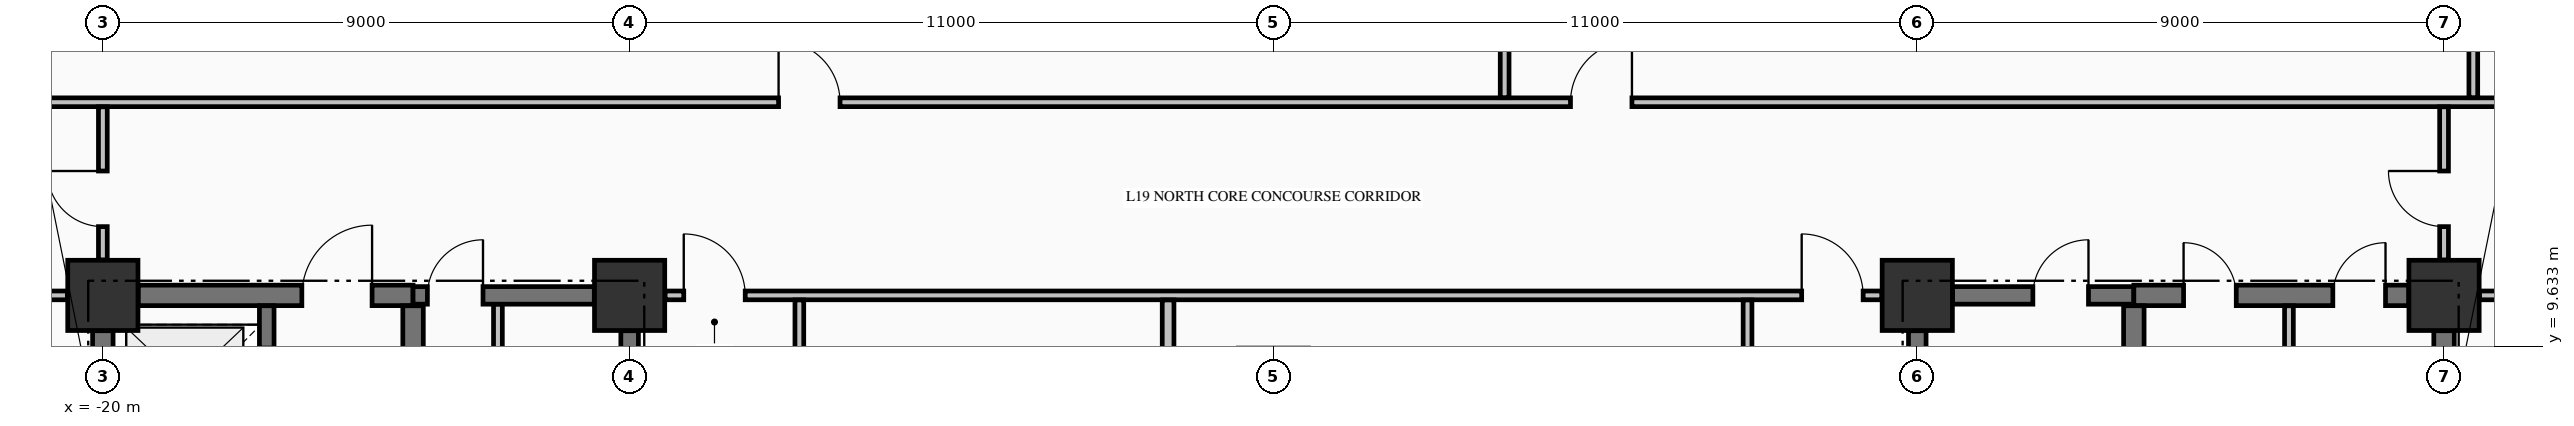
"""IFC4 building model, lengths in metres.
Left out: names, types, materials, properties, quantities, classifications, styles, units other than length and angle.
Written with IfcOpenShell. Run it as: python <this file> out.ifc"""

import sys

from ifc_helpers import new_model, si_unit, direction, frame, frame_2d, origin, origin_2d, place, context, subcontext, project, spatial, rectangle, extrude, element, fill, save


model = new_model("IFC4")
c1 = context("Model", 3, precision=1e-05, world=origin(), true_north=direction((0.0, 1.0)))
c2 = subcontext(c1, "Body", "Model", "MODEL_VIEW")
j1 = project(units=[si_unit("LENGTHUNIT", "METRE"), si_unit("PLANEANGLEUNIT", "RADIAN")], contexts=[c1])
p1 = place(None, origin())
s1 = spatial("IfcSite", under=j1, at=p1, CompositionType="ELEMENT")
p2 = place(p1, origin())
s2 = spatial("IfcBuilding", under=s1, at=p2, CompositionType="ELEMENT")
p3 = place(p2, frame((0.0, 0.0, 78.61)))
s3 = spatial("IfcBuildingStorey", under=s2, at=p3, CompositionType="ELEMENT", Elevation=78.61)
for number, where, z_axis, x_axis in (
    (1, (-20.0, 10.5, -0.25), (0.0, 0.0, 1.0), (1.0, 0.0, 0.0)),
    (2, (-11.0, 10.5, -0.25), (0.0, 0.0, 1.0), (1.0, 0.0, 0.0)),
    (3, (11.0, 10.5, -0.25), (0.0, 0.0, 1.0), (1.0, 0.0, 0.0)),
    (4, (20.0, 10.5, -0.25), (0.0, 0.0, 1.0), (1.0, 0.0, 0.0)),
):
    element("IfcColumn", number, at=place(p3, frame(where, z_axis=z_axis, x_axis=x_axis)), inside=s3, PredefinedType="COLUMN", context=c2, shape_type="SweptSolid", body=[
        extrude(rectangle(XDim=1.2, YDim=1.2, at=origin_2d()), origin(), (0.0, 0.0, 1.0), 3.395),
    ])
p4 = place(p3, frame((-19.396, 10.5, 0.0), z_axis=(0.0, 0.0, 1.0), x_axis=(1.0, 0.0, 0.0)))
e5 = element("IfcWall", 5, at=p4, inside=s3, PredefinedType="SHEAR", context=c2, shape_type="SweptSolid", body=[
    extrude(rectangle(XDim=4.696, YDim=0.35, at=frame_2d((2.348, 0.0))), origin(), (0.0, 0.0, 1.0), 3.145),
])
p5 = place(p4, frame((2.796, 0.0, 0.0)))
e6 = element("IfcOpeningElement", 6, at=p5, cuts=e5, PredefinedType="OPENING", context=c2, shape_type="SweptSolid", body=[
    extrude(rectangle(XDim=1.2, YDim=2.15, at=frame_2d((0.6, 1.075))), frame((0.0, 0.185, 0.0), z_axis=(0.0, -1.0, 0.0), x_axis=(1.0, 0.0, 0.0)), (0.0, 0.0, 1.0), 0.37),
])
p6 = place(p3, frame((-14.7, 10.5, 0.0), z_axis=(0.0, 0.0, 1.0), x_axis=(1.0, 0.0, 0.0)))
e7 = element("IfcWall", 7, at=p6, inside=s3, PredefinedType="SHEAR", context=c2, shape_type="SweptSolid", body=[
    extrude(rectangle(XDim=3.096, YDim=0.3, at=frame_2d((1.548, 0.0))), origin(), (0.0, 0.0, 1.0), 3.145),
])
p7 = place(p6, frame((0.245, 0.0, 0.0)))
e8 = element("IfcOpeningElement", 8, at=p7, cuts=e7, PredefinedType="OPENING", context=c2, shape_type="SweptSolid", body=[
    extrude(rectangle(XDim=0.95, YDim=2.15, at=frame_2d((0.475, 1.075))), frame((0.0, 0.16, 0.0), z_axis=(0.0, -1.0, 0.0), x_axis=(1.0, 0.0, 0.0)), (0.0, 0.0, 1.0), 0.32),
])
p8 = place(p3, frame((11.604, 10.5, 0.0), z_axis=(0.0, 0.0, 1.0), x_axis=(1.0, 0.0, 0.0)))
e9 = element("IfcWall", 9, at=p8, inside=s3, PredefinedType="SHEAR", context=c2, shape_type="SweptSolid", body=[
    extrude(rectangle(XDim=3.096, YDim=0.3, at=frame_2d((1.548, 0.0))), origin(), (0.0, 0.0, 1.0), 3.145),
])
p9 = place(p8, frame((1.371, 0.0, 0.0)))
e10 = element("IfcOpeningElement", 10, at=p9, cuts=e9, PredefinedType="OPENING", context=c2, shape_type="SweptSolid", body=[
    extrude(rectangle(XDim=0.95, YDim=2.15, at=frame_2d((0.475, 1.075))), frame((0.0, 0.16, 0.0), z_axis=(0.0, -1.0, 0.0), x_axis=(1.0, 0.0, 0.0)), (0.0, 0.0, 1.0), 0.32),
])
p10 = place(p3, frame((14.7, 10.5, 0.0), z_axis=(0.0, 0.0, 1.0), x_axis=(1.0, 0.0, 0.0)))
e11 = element("IfcWall", 11, at=p10, inside=s3, PredefinedType="SHEAR", context=c2, shape_type="SweptSolid", body=[
    extrude(rectangle(XDim=4.696, YDim=0.35, at=frame_2d((2.348, 0.0))), origin(), (0.0, 0.0, 1.0), 3.145),
])
p11 = place(p10, frame((0.85, 0.0, 0.0)))
e12 = element("IfcOpeningElement", 12, at=p11, cuts=e11, PredefinedType="OPENING", context=c2, shape_type="SweptSolid", body=[
    extrude(rectangle(XDim=0.9, YDim=2.15, at=frame_2d((0.45, 1.075))), frame((0.0, 0.185, 0.0), z_axis=(0.0, -1.0, 0.0), x_axis=(1.0, 0.0, 0.0)), (0.0, 0.0, 1.0), 0.37),
])
p12 = place(p10, frame((3.4, 0.0, 0.0)))
e13 = element("IfcOpeningElement", 13, at=p12, cuts=e11, PredefinedType="OPENING", context=c2, shape_type="SweptSolid", body=[
    extrude(rectangle(XDim=0.9, YDim=2.15, at=frame_2d((0.45, 1.075))), frame((0.0, 0.185, 0.0), z_axis=(0.0, -1.0, 0.0), x_axis=(1.0, 0.0, 0.0)), (0.0, 0.0, 1.0), 0.37),
])
p13 = place(p3, frame((-28.835, 10.5, 0.0), z_axis=(0.0, 0.0, 1.0), x_axis=(1.0, 0.0, 0.0)))
e14 = element("IfcWall", 14, at=p13, inside=s3, PredefinedType="PARTITIONING", context=c2, shape_type="SweptSolid", body=[
    extrude(rectangle(XDim=8.229, YDim=0.15, at=frame_2d((4.115, 0.0))), origin(), (0.0, 0.0, 1.0), 3.145),
])
p14 = place(p13, frame((3.86, 0.0, 0.0)))
e15 = element("IfcOpeningElement", 15, at=p14, cuts=e14, PredefinedType="OPENING", context=c2, shape_type="SweptSolid", body=[
    extrude(rectangle(XDim=0.95, YDim=2.15, at=frame_2d((0.475, 1.075))), frame((0.0, 0.085, 0.0), z_axis=(0.0, -1.0, 0.0), x_axis=(1.0, 0.0, 0.0)), (0.0, 0.0, 1.0), 0.17),
])
p15 = place(p3, frame((-10.394, 10.5, 0.0), z_axis=(0.0, 0.0, 1.0), x_axis=(1.0, 0.0, 0.0)))
e16 = element("IfcWall", 16, at=p15, inside=s3, PredefinedType="PARTITIONING", context=c2, shape_type="SweptSolid", body=[
    extrude(rectangle(XDim=20.788, YDim=0.15, at=frame_2d((10.394, 0.0))), origin(), (0.0, 0.0, 1.0), 3.145),
])
p16 = place(p15, frame((0.319, 0.0, 0.0)))
e17 = element("IfcOpeningElement", 17, at=p16, cuts=e16, PredefinedType="OPENING", context=c2, shape_type="SweptSolid", body=[
    extrude(rectangle(XDim=1.05, YDim=2.15, at=frame_2d((0.525, 1.075))), frame((0.0, 0.085, 0.0), z_axis=(0.0, -1.0, 0.0), x_axis=(1.0, 0.0, 0.0)), (0.0, 0.0, 1.0), 0.17),
])
p17 = place(p15, frame((19.419, 0.0, 0.0)))
e18 = element("IfcOpeningElement", 18, at=p17, cuts=e16, PredefinedType="OPENING", context=c2, shape_type="SweptSolid", body=[
    extrude(rectangle(XDim=1.05, YDim=2.15, at=frame_2d((0.525, 1.075))), frame((0.0, 0.085, 0.0), z_axis=(0.0, -1.0, 0.0), x_axis=(1.0, 0.0, 0.0)), (0.0, 0.0, 1.0), 0.17),
])
p18 = place(p3, frame((20.606, 10.5, 0.0), z_axis=(0.0, 0.0, 1.0), x_axis=(1.0, 0.0, 0.0)))
e19 = element("IfcWall", 19, at=p18, inside=s3, PredefinedType="PARTITIONING", context=c2, shape_type="SweptSolid", body=[
    extrude(rectangle(XDim=3.229, YDim=0.15, at=frame_2d((1.615, 0.0))), origin(), (0.0, 0.0, 1.0), 3.145),
])
p19 = place(p18, frame((0.894, 0.0, 0.0)))
e20 = element("IfcOpeningElement", 20, at=p19, cuts=e19, PredefinedType="OPENING", context=c2, shape_type="SweptSolid", body=[
    extrude(rectangle(XDim=1.0, YDim=2.15, at=frame_2d((0.5, 1.075))), frame((0.0, 0.085, 0.0), z_axis=(0.0, -1.0, 0.0), x_axis=(1.0, 0.0, 0.0)), (0.0, 0.0, 1.0), 0.17),
])
p20 = place(p3, frame((-28.835, 13.8, 0.0), z_axis=(0.0, 0.0, 1.0), x_axis=(1.0, 0.0, 0.0)))
e21 = element("IfcWall", 21, at=p20, inside=s3, PredefinedType="PARTITIONING", context=c2, shape_type="SweptSolid", body=[
    extrude(rectangle(XDim=52.67, YDim=0.15, at=frame_2d((26.335, 0.0))), origin(), (0.0, 0.0, 1.0), 3.145),
])
p21 = place(p20, frame((20.38, 0.0, 0.0)))
e22 = element("IfcOpeningElement", 22, at=p21, cuts=e21, PredefinedType="OPENING", context=c2, shape_type="SweptSolid", body=[
    extrude(rectangle(XDim=1.05, YDim=2.15, at=frame_2d((0.525, 1.075))), frame((0.0, 0.085, 0.0), z_axis=(0.0, -1.0, 0.0), x_axis=(1.0, 0.0, 0.0)), (0.0, 0.0, 1.0), 0.17),
])
p22 = place(p20, frame((33.91, 0.0, 0.0)))
e23 = element("IfcOpeningElement", 23, at=p22, cuts=e21, PredefinedType="OPENING", context=c2, shape_type="SweptSolid", body=[
    extrude(rectangle(XDim=1.05, YDim=2.15, at=frame_2d((0.525, 1.075))), frame((0.0, 0.085, 0.0), z_axis=(0.0, -1.0, 0.0), x_axis=(1.0, 0.0, 0.0)), (0.0, 0.0, 1.0), 0.17),
])
p23 = place(p3, frame((-20.0, 7.727, 0.0), z_axis=(0.0, 0.0, 1.0), x_axis=(0.0, 1.0, 0.0)))
e24 = element("IfcWall", 24, at=p23, inside=s3, PredefinedType="SHEAR", context=c2, shape_type="SweptSolid", body=[
    extrude(rectangle(XDim=2.169, YDim=0.35, at=frame_2d((1.084, 0.0))), origin(), (0.0, 0.0, 1.0), 3.145),
])
p24 = place(p3, frame((-17.2, 7.727, 0.0), z_axis=(0.0, 0.0, 1.0), x_axis=(0.0, 1.0, 0.0)))
e25 = element("IfcWall", 25, at=p24, inside=s3, PredefinedType="SOLIDWALL", context=c2, shape_type="SweptSolid", body=[
    extrude(rectangle(XDim=2.596, YDim=0.25, at=frame_2d((1.298, 0.0))), origin(), (0.0, 0.0, 1.0), 3.145),
])
p25 = place(p24, frame((0.773, 0.0, 0.0)))
e26 = element("IfcOpeningElement", 26, at=p25, cuts=e25, PredefinedType="OPENING", context=c2, shape_type="SweptSolid", body=[
    extrude(rectangle(XDim=1.1, YDim=2.2, at=frame_2d((0.55, 1.1))), frame((0.0, 0.135, 0.0), z_axis=(0.0, -1.0, 0.0), x_axis=(1.0, 0.0, 0.0)), (0.0, 0.0, 1.0), 0.27),
])
p26 = place(p3, frame((-14.7, 5.852, 0.0), z_axis=(0.0, 0.0, 1.0), x_axis=(0.0, 1.0, 0.0)))
e27 = element("IfcWall", 27, at=p26, inside=s3, PredefinedType="SHEAR", context=c2, shape_type="SweptSolid", body=[
    extrude(rectangle(XDim=4.471, YDim=0.35, at=frame_2d((2.235, 0.0))), origin(), (0.0, 0.0, 1.0), 3.145),
])
for number, where, z_axis, x_axis in (
    (28, (-11.0, 5.852, 0.0), (0.0, 0.0, 1.0), (0.0, 1.0, 0.0)),
    (29, (11.0, 5.852, 0.0), (0.0, 0.0, 1.0), (0.0, 1.0, 0.0)),
):
    element("IfcWall", number, at=place(p3, frame(where, z_axis=z_axis, x_axis=x_axis)), inside=s3, PredefinedType="SHEAR", context=c2, shape_type="SweptSolid", body=[
        extrude(rectangle(XDim=4.044, YDim=0.3, at=frame_2d((2.022, 0.0))), origin(), (0.0, 0.0, 1.0), 3.145),
    ])
p27 = place(p3, frame((14.7, 5.852, 0.0), z_axis=(0.0, 0.0, 1.0), x_axis=(0.0, 1.0, 0.0)))
e30 = element("IfcWall", 30, at=p27, inside=s3, PredefinedType="SHEAR", context=c2, shape_type="SweptSolid", body=[
    extrude(rectangle(XDim=4.471, YDim=0.35, at=frame_2d((2.235, 0.0))), origin(), (0.0, 0.0, 1.0), 3.145),
])
p28 = place(p3, frame((20.0, 0.604, 0.0), z_axis=(0.0, 0.0, 1.0), x_axis=(0.0, 1.0, 0.0)))
e31 = element("IfcWall", 31, at=p28, inside=s3, PredefinedType="SHEAR", context=c2, shape_type="SweptSolid", body=[
    extrude(rectangle(XDim=9.292, YDim=0.35, at=frame_2d((4.646, 0.0))), origin(), (0.0, 0.0, 1.0), 3.145),
])
p29 = place(p3, frame((-20.0, 11.106, 0.0), z_axis=(0.0, 0.0, 1.0), x_axis=(0.0, 1.0, 0.0)))
e32 = element("IfcWall", 32, at=p29, inside=s3, PredefinedType="PARTITIONING", context=c2, shape_type="SweptSolid", body=[
    extrude(rectangle(XDim=2.616, YDim=0.15, at=frame_2d((1.308, 0.0))), origin(), (0.0, 0.0, 1.0), 2.485),
])
p30 = place(p29, frame((0.569, 0.0, 0.0)))
e33 = element("IfcOpeningElement", 33, at=p30, cuts=e32, PredefinedType="OPENING", context=c2, shape_type="SweptSolid", body=[
    extrude(rectangle(XDim=0.95, YDim=2.15, at=frame_2d((0.475, 1.075))), frame((0.0, 0.085, 0.0), z_axis=(0.0, -1.0, 0.0), x_axis=(1.0, 0.0, 0.0)), (0.0, 0.0, 1.0), 0.17),
])
p31 = place(p3, frame((-13.25, 5.853, 0.0), z_axis=(0.0, 0.0, 1.0), x_axis=(0.0, 1.0, 0.0)))
e34 = element("IfcWall", 34, at=p31, inside=s3, PredefinedType="PARTITIONING", context=c2, shape_type="SweptSolid", body=[
    extrude(rectangle(XDim=4.494, YDim=0.15, at=frame_2d((2.247, 0.0))), origin(), (0.0, 0.0, 1.0), 3.145),
])
p32 = place(p31, frame((1.472, 0.0, 0.0)))
e35 = element("IfcOpeningElement", 35, at=p32, cuts=e34, PredefinedType="OPENING", context=c2, shape_type="SweptSolid", body=[
    extrude(rectangle(XDim=0.95, YDim=2.15, at=frame_2d((0.475, 1.075))), frame((0.0, 0.085, 0.0), z_axis=(0.0, -1.0, 0.0), x_axis=(1.0, 0.0, 0.0)), (0.0, 0.0, 1.0), 0.17),
])
p33 = place(p3, frame((-8.1, -3.097, 0.0), z_axis=(0.0, 0.0, 1.0), x_axis=(0.0, 1.0, 0.0)))
e36 = element("IfcWall", 36, at=p33, inside=s3, PredefinedType="PARTITIONING", context=c2, shape_type="SweptSolid", body=[
    extrude(rectangle(XDim=13.519, YDim=0.15, at=frame_2d((6.76, 0.0))), origin(), (0.0, 0.0, 1.0), 3.145),
])
p34 = place(p33, frame((6.222, 0.0, 0.0)))
e37 = element("IfcOpeningElement", 37, at=p34, cuts=e36, PredefinedType="OPENING", context=c2, shape_type="SweptSolid", body=[
    extrude(rectangle(XDim=1.05, YDim=2.15, at=frame_2d((0.525, 1.075))), frame((0.0, 0.085, 0.0), z_axis=(0.0, -1.0, 0.0), x_axis=(1.0, 0.0, 0.0)), (0.0, 0.0, 1.0), 0.17),
])
p35 = place(p3, frame((-1.8, -1.097, 0.0), z_axis=(0.0, 0.0, 1.0), x_axis=(0.0, 1.0, 0.0)))
e38 = element("IfcWall", 38, at=p35, inside=s3, PredefinedType="PARTITIONING", context=c2, shape_type="SweptSolid", body=[
    extrude(rectangle(XDim=11.519, YDim=0.2, at=frame_2d((5.76, 0.0))), origin(), (0.0, 0.0, 1.0), 3.145),
])
p36 = place(p3, frame((3.95, 13.878, 0.0), z_axis=(0.0, 0.0, 1.0), x_axis=(0.0, 1.0, 0.0)))
e39 = element("IfcWall", 39, at=p36, inside=s3, PredefinedType="PARTITIONING", context=c2, shape_type="SweptSolid", body=[
    extrude(rectangle(XDim=12.562, YDim=0.15, at=frame_2d((6.281, 0.0))), origin(), (0.0, 0.0, 1.0), 3.145),
])
p37 = place(p3, frame((8.1, -1.097, 0.0), z_axis=(0.0, 0.0, 1.0), x_axis=(0.0, 1.0, 0.0)))
e40 = element("IfcWall", 40, at=p37, inside=s3, PredefinedType="PARTITIONING", context=c2, shape_type="SweptSolid", body=[
    extrude(rectangle(XDim=11.519, YDim=0.15, at=frame_2d((5.76, 0.0))), origin(), (0.0, 0.0, 1.0), 3.145),
])
p38 = place(p37, frame((5.197, 0.0, 0.0)))
e41 = element("IfcOpeningElement", 41, at=p38, cuts=e40, PredefinedType="OPENING", context=c2, shape_type="SweptSolid", body=[
    extrude(rectangle(XDim=1.1, YDim=2.15, at=frame_2d((0.55, 1.075))), frame((0.0, 0.085, 0.0), z_axis=(0.0, -1.0, 0.0), x_axis=(1.0, 0.0, 0.0)), (0.0, 0.0, 1.0), 0.17),
])
p39 = place(p3, frame((17.35, -4.422, 0.0), z_axis=(0.0, 0.0, 1.0), x_axis=(0.0, 1.0, 0.0)))
e42 = element("IfcWall", 42, at=p39, inside=s3, PredefinedType="PARTITIONING", context=c2, shape_type="SweptSolid", body=[
    extrude(rectangle(XDim=14.744, YDim=0.15, at=frame_2d((7.372, 0.0))), origin(), (0.0, 0.0, 1.0), 3.145),
])
p40 = place(p3, frame((20.0, 11.106, 0.0), z_axis=(0.0, 0.0, 1.0), x_axis=(0.0, 1.0, 0.0)))
e43 = element("IfcWall", 43, at=p40, inside=s3, PredefinedType="PARTITIONING", context=c2, shape_type="SweptSolid", body=[
    extrude(rectangle(XDim=2.616, YDim=0.15, at=frame_2d((1.308, 0.0))), origin(), (0.0, 0.0, 1.0), 3.145),
])
p41 = place(p40, frame((0.569, 0.0, 0.0)))
e44 = element("IfcOpeningElement", 44, at=p41, cuts=e43, PredefinedType="OPENING", context=c2, shape_type="SweptSolid", body=[
    extrude(rectangle(XDim=0.95, YDim=2.15, at=frame_2d((0.475, 1.075))), frame((0.0, 0.085, 0.0), z_axis=(0.0, -1.0, 0.0), x_axis=(1.0, 0.0, 0.0)), (0.0, 0.0, 1.0), 0.17),
])
p42 = place(p3, frame((20.5, 13.878, 0.0), z_axis=(0.0, 0.0, 1.0), x_axis=(0.0, 1.0, 0.0)))
e45 = element("IfcWall", 45, at=p42, inside=s3, PredefinedType="PARTITIONING", context=c2, shape_type="SweptSolid", body=[
    extrude(rectangle(XDim=8.416, YDim=0.15, at=frame_2d((4.208, 0.0))), origin(), (0.0, 0.0, 1.0), 3.145),
])
p43 = place(p7, origin())
e46 = element("IfcDoor", 46, at=p43, inside=s3, OperationType="SINGLE_SWING_RIGHT", PredefinedType="DOOR", context=c2, shape_type="SweptSolid", body=[
    extrude(rectangle(XDim=0.95, YDim=2.15, at=frame_2d((0.475, 1.075))), frame((0.0, 0.025, 0.0), z_axis=(0.0, -1.0, 0.0), x_axis=(1.0, 0.0, 0.0)), (0.0, 0.0, 1.0), 0.05),
])
fill(e8, e46)
p44 = place(p9, origin())
e47 = element("IfcDoor", 47, at=p44, inside=s3, OperationType="SINGLE_SWING_RIGHT", PredefinedType="DOOR", context=c2, shape_type="SweptSolid", body=[
    extrude(rectangle(XDim=0.95, YDim=2.15, at=frame_2d((0.475, 1.075))), frame((0.0, 0.025, 0.0), z_axis=(0.0, -1.0, 0.0), x_axis=(1.0, 0.0, 0.0)), (0.0, 0.0, 1.0), 0.05),
])
fill(e10, e47)
p45 = place(p5, origin())
e48 = element("IfcDoor", 48, at=p45, inside=s3, OperationType="SINGLE_SWING_RIGHT", PredefinedType="DOOR", context=c2, shape_type="SweptSolid", body=[
    extrude(rectangle(XDim=1.2, YDim=2.15, at=frame_2d((0.6, 1.075))), frame((0.0, 0.025, 0.0), z_axis=(0.0, -1.0, 0.0), x_axis=(1.0, 0.0, 0.0)), (0.0, 0.0, 1.0), 0.05),
])
fill(e6, e48)
p46 = place(p11, origin())
e49 = element("IfcDoor", 49, at=p46, inside=s3, OperationType="SINGLE_SWING_LEFT", PredefinedType="DOOR", context=c2, shape_type="SweptSolid", body=[
    extrude(rectangle(XDim=0.9, YDim=2.15, at=frame_2d((0.45, 1.075))), frame((0.0, 0.025, 0.0), z_axis=(0.0, -1.0, 0.0), x_axis=(1.0, 0.0, 0.0)), (0.0, 0.0, 1.0), 0.05),
])
fill(e12, e49)
p47 = place(p12, origin())
e50 = element("IfcDoor", 50, at=p47, inside=s3, OperationType="SINGLE_SWING_RIGHT", PredefinedType="DOOR", context=c2, shape_type="SweptSolid", body=[
    extrude(rectangle(XDim=0.9, YDim=2.15, at=frame_2d((0.45, 1.075))), frame((0.0, 0.025, 0.0), z_axis=(0.0, -1.0, 0.0), x_axis=(1.0, 0.0, 0.0)), (0.0, 0.0, 1.0), 0.05),
])
fill(e13, e50)
p48 = place(p16, origin())
e51 = element("IfcDoor", 51, at=p48, inside=s3, OperationType="SINGLE_SWING_LEFT", PredefinedType="DOOR", context=c2, shape_type="SweptSolid", body=[
    extrude(rectangle(XDim=1.05, YDim=2.15, at=frame_2d((0.525, 1.075))), frame((0.0, 0.025, 0.0), z_axis=(0.0, -1.0, 0.0), x_axis=(1.0, 0.0, 0.0)), (0.0, 0.0, 1.0), 0.05),
])
fill(e17, e51)
p49 = place(p17, origin())
e52 = element("IfcDoor", 52, at=p49, inside=s3, OperationType="SINGLE_SWING_LEFT", PredefinedType="DOOR", context=c2, shape_type="SweptSolid", body=[
    extrude(rectangle(XDim=1.05, YDim=2.15, at=frame_2d((0.525, 1.075))), frame((0.0, 0.025, 0.0), z_axis=(0.0, -1.0, 0.0), x_axis=(1.0, 0.0, 0.0)), (0.0, 0.0, 1.0), 0.05),
])
fill(e18, e52)
p50 = place(p21, origin())
e53 = element("IfcDoor", 53, at=p50, inside=s3, OperationType="SINGLE_SWING_LEFT", PredefinedType="DOOR", context=c2, shape_type="SweptSolid", body=[
    extrude(rectangle(XDim=1.05, YDim=2.15, at=frame_2d((0.525, 1.075))), frame((0.0, 0.025, 0.0), z_axis=(0.0, -1.0, 0.0), x_axis=(1.0, 0.0, 0.0)), (0.0, 0.0, 1.0), 0.05),
])
fill(e22, e53)
p51 = place(p22, origin())
e54 = element("IfcDoor", 54, at=p51, inside=s3, OperationType="SINGLE_SWING_RIGHT", PredefinedType="DOOR", context=c2, shape_type="SweptSolid", body=[
    extrude(rectangle(XDim=1.05, YDim=2.15, at=frame_2d((0.525, 1.075))), frame((0.0, 0.025, 0.0), z_axis=(0.0, -1.0, 0.0), x_axis=(1.0, 0.0, 0.0)), (0.0, 0.0, 1.0), 0.05),
])
fill(e23, e54)
p52 = place(p30, origin())
e55 = element("IfcDoor", 55, at=p52, inside=s3, OperationType="SINGLE_SWING_RIGHT", PredefinedType="DOOR", context=c2, shape_type="SweptSolid", body=[
    extrude(rectangle(XDim=0.95, YDim=2.15, at=frame_2d((0.475, 1.075))), frame((0.0, 0.025, 0.0), z_axis=(0.0, -1.0, 0.0), x_axis=(1.0, 0.0, 0.0)), (0.0, 0.0, 1.0), 0.05),
])
fill(e33, e55)
p53 = place(p41, origin())
e56 = element("IfcDoor", 56, at=p53, inside=s3, OperationType="SINGLE_SWING_RIGHT", PredefinedType="DOOR", context=c2, shape_type="SweptSolid", body=[
    extrude(rectangle(XDim=0.95, YDim=2.15, at=frame_2d((0.475, 1.075))), frame((0.0, 0.025, 0.0), z_axis=(0.0, -1.0, 0.0), x_axis=(1.0, 0.0, 0.0)), (0.0, 0.0, 1.0), 0.05),
])
fill(e44, e56)
save(model, sys.argv[1])
